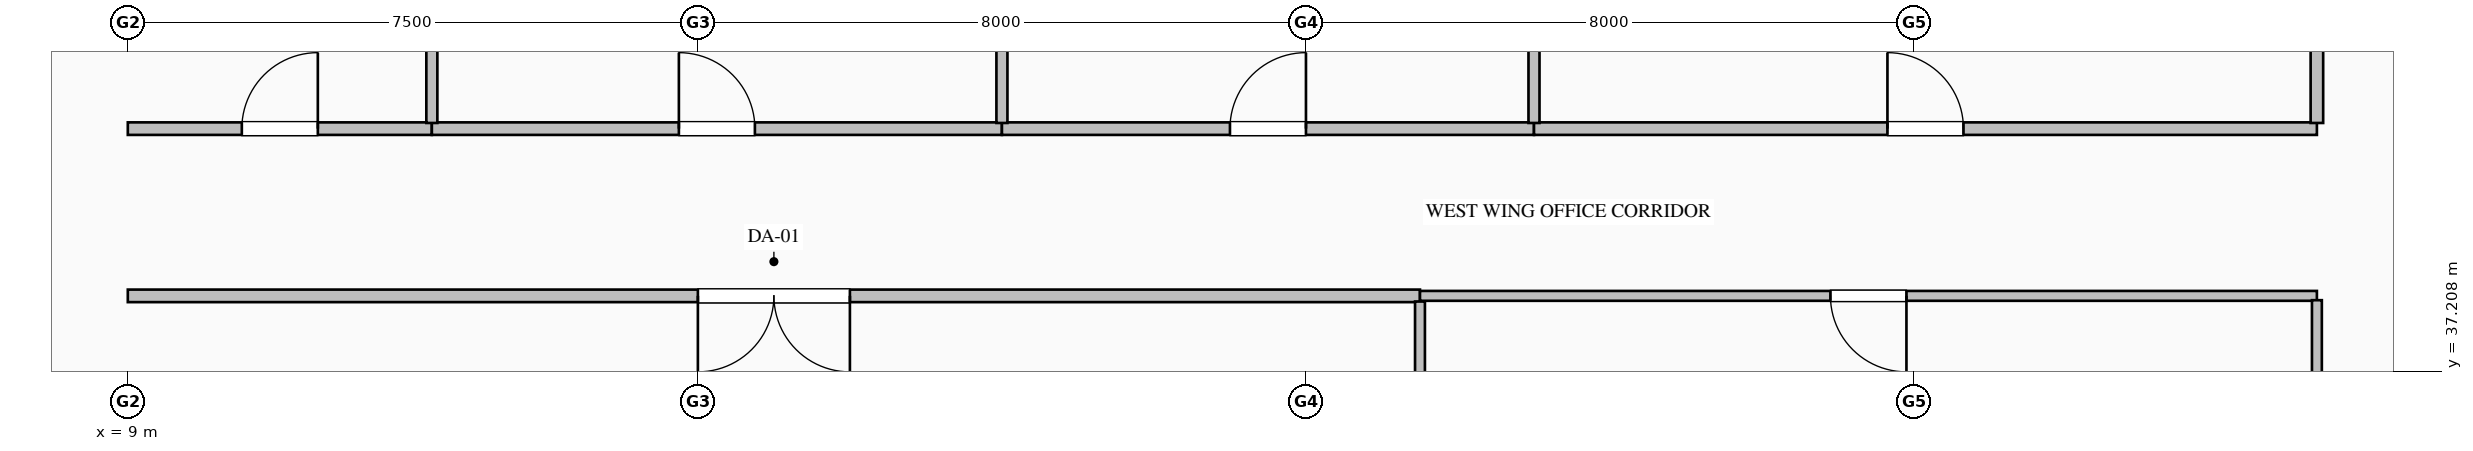
"""IFC4 building model, lengths in metres.
Left out: names, types, materials, properties, quantities, classifications, styles, units other than length and angle.
Written with IfcOpenShell. Run it as: python <this file> out.ifc"""

import sys

from ifc_helpers import new_model, si_unit, direction, frame, frame_2d, origin, place, context, subcontext, project, spatial, rectangle, extrude, element, fill, save


model = new_model("IFC4")
c1 = context("Model", 3, precision=1e-05, world=origin(), true_north=direction((0.0, 1.0)))
c2 = subcontext(c1, "Body", "Model", "MODEL_VIEW")
j1 = project(units=[si_unit("LENGTHUNIT", "METRE"), si_unit("PLANEANGLEUNIT", "RADIAN")], contexts=[c1])
p1 = place(None, origin())
s1 = spatial("IfcSite", under=j1, at=p1, CompositionType="ELEMENT")
p2 = place(p1, origin())
s2 = spatial("IfcBuilding", under=s1, at=p2, CompositionType="ELEMENT")
p3 = place(p2, frame((0.0, 0.0, 84.2)))
s3 = spatial("IfcBuildingStorey", under=s2, at=p3, CompositionType="ELEMENT", Elevation=84.2)
p4 = place(p3, frame((9.0, 40.4, 0.0), z_axis=(0.0, 0.0, 1.0), x_axis=(1.0, 0.0, 0.0)))
e1 = element("IfcWall", 1, at=p4, inside=s3, PredefinedType="PARTITIONING", context=c2, shape_type="SweptSolid", body=[
    extrude(rectangle(XDim=4.0, YDim=0.165, at=frame_2d((2.0, 0.0))), origin(), (0.0, 0.0, 1.0), 3.75),
])
p5 = place(p4, frame((1.5, 0.0, 0.0)))
e2 = element("IfcOpeningElement", 2, at=p5, cuts=e1, PredefinedType="OPENING", context=c2, shape_type="SweptSolid", body=[
    extrude(rectangle(XDim=1.0, YDim=2.15, at=frame_2d((0.5, 1.075))), frame((0.0, 0.093, 0.0), z_axis=(0.0, -1.0, 0.0), x_axis=(1.0, 0.0, 0.0)), (0.0, 0.0, 1.0), 0.185),
])
p6 = place(p3, frame((13.0, 40.4, 0.0), z_axis=(0.0, 0.0, 1.0), x_axis=(1.0, 0.0, 0.0)))
e3 = element("IfcWall", 3, at=p6, inside=s3, PredefinedType="PARTITIONING", context=c2, shape_type="SweptSolid", body=[
    extrude(rectangle(XDim=7.5, YDim=0.165, at=frame_2d((3.75, 0.0))), origin(), (0.0, 0.0, 1.0), 3.75),
])
p7 = place(p6, frame((3.25, 0.0, 0.0)))
e4 = element("IfcOpeningElement", 4, at=p7, cuts=e3, PredefinedType="OPENING", context=c2, shape_type="SweptSolid", body=[
    extrude(rectangle(XDim=1.0, YDim=2.15, at=frame_2d((0.5, 1.075))), frame((0.0, 0.093, 0.0), z_axis=(0.0, -1.0, 0.0), x_axis=(1.0, 0.0, 0.0)), (0.0, 0.0, 1.0), 0.185),
])
p8 = place(p3, frame((20.5, 40.4, 0.0), z_axis=(0.0, 0.0, 1.0), x_axis=(1.0, 0.0, 0.0)))
e5 = element("IfcWall", 5, at=p8, inside=s3, PredefinedType="PARTITIONING", context=c2, shape_type="SweptSolid", body=[
    extrude(rectangle(XDim=7.0, YDim=0.165, at=frame_2d((3.5, 0.0))), origin(), (0.0, 0.0, 1.0), 3.75),
])
p9 = place(p8, frame((3.0, 0.0, 0.0)))
e6 = element("IfcOpeningElement", 6, at=p9, cuts=e5, PredefinedType="OPENING", context=c2, shape_type="SweptSolid", body=[
    extrude(rectangle(XDim=1.0, YDim=2.15, at=frame_2d((0.5, 1.075))), frame((0.0, 0.093, 0.0), z_axis=(0.0, -1.0, 0.0), x_axis=(1.0, 0.0, 0.0)), (0.0, 0.0, 1.0), 0.185),
])
p10 = place(p3, frame((27.5, 40.4, 0.0), z_axis=(0.0, 0.0, 1.0), x_axis=(1.0, 0.0, 0.0)))
e7 = element("IfcWall", 7, at=p10, inside=s3, PredefinedType="PARTITIONING", context=c2, shape_type="SweptSolid", body=[
    extrude(rectangle(XDim=10.3, YDim=0.165, at=frame_2d((5.15, 0.0))), origin(), (0.0, 0.0, 1.0), 3.75),
])
p11 = place(p10, frame((4.65, 0.0, 0.0)))
e8 = element("IfcOpeningElement", 8, at=p11, cuts=e7, PredefinedType="OPENING", context=c2, shape_type="SweptSolid", body=[
    extrude(rectangle(XDim=1.0, YDim=2.15, at=frame_2d((0.5, 1.075))), frame((0.0, 0.093, 0.0), z_axis=(0.0, -1.0, 0.0), x_axis=(1.0, 0.0, 0.0)), (0.0, 0.0, 1.0), 0.185),
])
p12 = place(p3, frame((26.0, 38.2, 0.0), z_axis=(0.0, 0.0, 1.0), x_axis=(-1.0, 0.0, 0.0)))
e9 = element("IfcWall", 9, at=p12, inside=s3, PredefinedType="PARTITIONING", context=c2, shape_type="SweptSolid", body=[
    extrude(rectangle(XDim=17.0, YDim=0.165, at=frame_2d((8.5, 0.0))), origin(), (0.0, 0.0, 1.0), 3.75),
])
p13 = place(p12, frame((7.5, 0.0, 0.0)))
e10 = element("IfcOpeningElement", 10, at=p13, cuts=e9, PredefinedType="OPENING", context=c2, shape_type="SweptSolid", body=[
    extrude(rectangle(XDim=2.0, YDim=2.4, at=frame_2d((1.0, 1.2))), frame((0.0, 0.093, 0.0), z_axis=(0.0, -1.0, 0.0), x_axis=(1.0, 0.0, 0.0)), (0.0, 0.0, 1.0), 0.185),
])
p14 = place(p3, frame((37.8, 38.2, 0.0), z_axis=(0.0, 0.0, 1.0), x_axis=(-1.0, 0.0, 0.0)))
e11 = element("IfcWall", 11, at=p14, inside=s3, PredefinedType="PARTITIONING", context=c2, shape_type="SweptSolid", body=[
    extrude(rectangle(XDim=11.8, YDim=0.13, at=frame_2d((5.9, 0.0))), origin(), (0.0, 0.0, 1.0), 3.75),
])
p15 = place(p14, frame((5.4, 0.0, 0.0)))
e12 = element("IfcOpeningElement", 12, at=p15, cuts=e11, PredefinedType="OPENING", context=c2, shape_type="SweptSolid", body=[
    extrude(rectangle(XDim=1.0, YDim=2.15, at=frame_2d((0.5, 1.075))), frame((0.0, 0.075, 0.0), z_axis=(0.0, -1.0, 0.0), x_axis=(1.0, 0.0, 0.0)), (0.0, 0.0, 1.0), 0.15),
])
p16 = place(p3, frame((37.8, 40.475, 0.0), z_axis=(0.0, 0.0, 1.0), x_axis=(0.0, 1.0, 0.0)))
e13 = element("IfcWall", 13, at=p16, inside=s3, PredefinedType="PARTITIONING", context=c2, shape_type="SweptSolid", body=[
    extrude(rectangle(XDim=3.651, YDim=0.165, at=frame_2d((1.825, 0.0))), origin(), (0.0, 0.0, 1.0), 3.75),
])
p17 = place(p3, frame((37.8, 34.057, 0.0), z_axis=(0.0, 0.0, 1.0), x_axis=(0.0, 1.0, 0.0)))
e14 = element("IfcWall", 14, at=p17, inside=s3, PredefinedType="PARTITIONING", context=c2, shape_type="SweptSolid", body=[
    extrude(rectangle(XDim=4.086, YDim=0.13, at=frame_2d((2.043, 0.0))), origin(), (0.0, 0.0, 1.0), 3.75),
])
for number, where, z_axis, x_axis in (
    (15, (13.0, 51.648, 0.0), (0.0, 0.0, 1.0), (0.0, -1.0, 0.0)),
    (16, (20.5, 51.648, 0.0), (0.0, 0.0, 1.0), (0.0, -1.0, 0.0)),
    (17, (27.5, 51.648, 0.0), (0.0, 0.0, 1.0), (0.0, -1.0, 0.0)),
):
    element("IfcWall", number, at=place(p3, frame(where, z_axis=z_axis, x_axis=x_axis)), inside=s3, PredefinedType="PARTITIONING", context=c2, shape_type="SweptSolid", body=[
        extrude(rectangle(XDim=11.173, YDim=0.145, at=frame_2d((5.587, 0.0))), origin(), (0.0, 0.0, 1.0), 3.75),
    ])
p18 = place(p3, frame((26.0, 38.125, 0.0), z_axis=(0.0, 0.0, 1.0), x_axis=(0.0, -1.0, 0.0)))
e18 = element("IfcWall", 18, at=p18, inside=s3, PredefinedType="PARTITIONING", context=c2, shape_type="SweptSolid", body=[
    extrude(rectangle(XDim=4.069, YDim=0.13, at=frame_2d((2.034, 0.0))), origin(), (0.0, 0.0, 1.0), 3.75),
])
p19 = place(p5, origin())
e19 = element("IfcDoor", 19, at=p19, inside=s3, OperationType="SINGLE_SWING_RIGHT", PredefinedType="DOOR", context=c2, shape_type="SweptSolid", body=[
    extrude(rectangle(XDim=1.0, YDim=2.15, at=frame_2d((0.5, 1.075))), frame((0.0, 0.025, 0.0), z_axis=(0.0, -1.0, 0.0), x_axis=(1.0, 0.0, 0.0)), (0.0, 0.0, 1.0), 0.05),
])
fill(e2, e19)
p20 = place(p7, origin())
e20 = element("IfcDoor", 20, at=p20, inside=s3, OperationType="SINGLE_SWING_LEFT", PredefinedType="DOOR", context=c2, shape_type="SweptSolid", body=[
    extrude(rectangle(XDim=1.0, YDim=2.15, at=frame_2d((0.5, 1.075))), frame((0.0, 0.025, 0.0), z_axis=(0.0, -1.0, 0.0), x_axis=(1.0, 0.0, 0.0)), (0.0, 0.0, 1.0), 0.05),
])
fill(e4, e20)
p21 = place(p9, origin())
e21 = element("IfcDoor", 21, at=p21, inside=s3, OperationType="SINGLE_SWING_RIGHT", PredefinedType="DOOR", context=c2, shape_type="SweptSolid", body=[
    extrude(rectangle(XDim=1.0, YDim=2.15, at=frame_2d((0.5, 1.075))), frame((0.0, 0.025, 0.0), z_axis=(0.0, -1.0, 0.0), x_axis=(1.0, 0.0, 0.0)), (0.0, 0.0, 1.0), 0.05),
])
fill(e6, e21)
p22 = place(p11, origin())
e22 = element("IfcDoor", 22, at=p22, inside=s3, OperationType="SINGLE_SWING_LEFT", PredefinedType="DOOR", context=c2, shape_type="SweptSolid", body=[
    extrude(rectangle(XDim=1.0, YDim=2.15, at=frame_2d((0.5, 1.075))), frame((0.0, 0.025, 0.0), z_axis=(0.0, -1.0, 0.0), x_axis=(1.0, 0.0, 0.0)), (0.0, 0.0, 1.0), 0.05),
])
fill(e8, e22)
p23 = place(p13, origin())
e23 = element("IfcDoor", 23, at=p23, inside=s3, OperationType="DOUBLE_DOOR_SINGLE_SWING", PredefinedType="DOOR", context=c2, shape_type="SweptSolid", body=[
    extrude(rectangle(XDim=2.0, YDim=2.4, at=frame_2d((1.0, 1.2))), frame((0.0, 0.025, 0.0), z_axis=(0.0, -1.0, 0.0), x_axis=(1.0, 0.0, 0.0)), (0.0, 0.0, 1.0), 0.05),
])
fill(e10, e23)
p24 = place(p15, origin())
e24 = element("IfcDoor", 24, at=p24, inside=s3, OperationType="SINGLE_SWING_LEFT", PredefinedType="DOOR", context=c2, shape_type="SweptSolid", body=[
    extrude(rectangle(XDim=1.0, YDim=2.15, at=frame_2d((0.5, 1.075))), frame((0.0, 0.025, 0.0), z_axis=(0.0, -1.0, 0.0), x_axis=(1.0, 0.0, 0.0)), (0.0, 0.0, 1.0), 0.05),
])
fill(e12, e24)
save(model, sys.argv[1])
